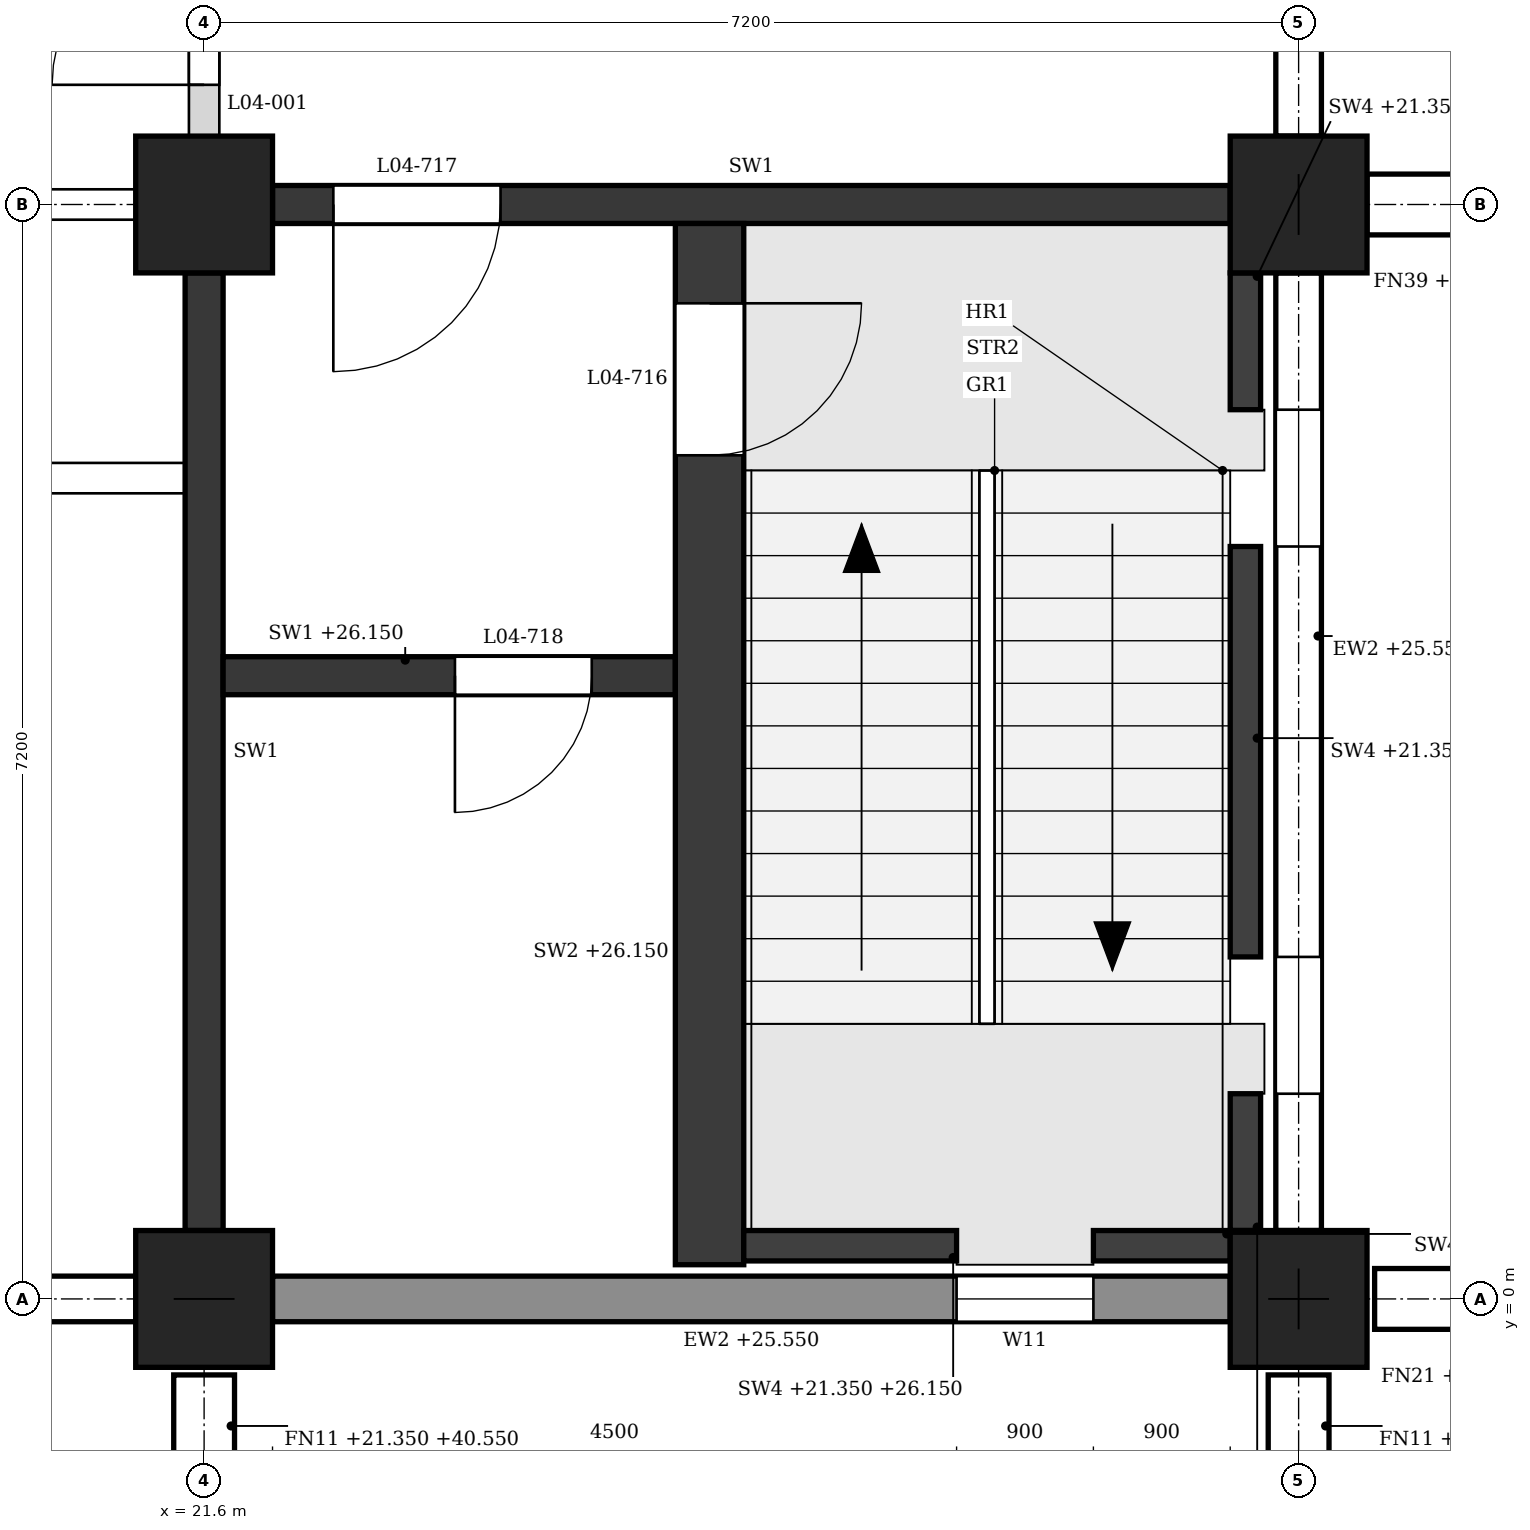
"""IFC4 building model, lengths in metres.
Left out: names, types, materials, properties, quantities, classifications, styles, units other than length and angle.
Written with IfcOpenShell. Run it as: python <this file> out.ifc"""

import sys

from ifc_helpers import new_model, si_unit, direction, frame, frame_2d, origin, origin_2d, place, context, subcontext, project, spatial, polyline, rectangle, outline, extrude, element, fill, save


model = new_model("IFC4")
c1 = context("Model", 3, precision=1e-05, world=origin(), true_north=direction((0.0, 1.0)))
c2 = subcontext(c1, "Body", "Model", "MODEL_VIEW")
j1 = project(units=[si_unit("LENGTHUNIT", "METRE"), si_unit("PLANEANGLEUNIT", "RADIAN")], contexts=[c1])
p1 = place(None, origin())
s1 = spatial("IfcSite", under=j1, at=p1, CompositionType="ELEMENT")
p2 = place(p1, origin())
s2 = spatial("IfcBuilding", under=s1, at=p2, CompositionType="ELEMENT")
p3 = place(p2, frame((0.0, 0.0, 21.6)))
s3 = spatial("IfcBuildingStorey", under=s2, at=p3, CompositionType="ELEMENT", Elevation=21.6)
for number, where, z_axis, x_axis in (
    (1, (21.6, 0.0, 0.0), (0.0, 0.0, 1.0), (1.0, 0.0, 0.0)),
    (2, (21.6, 7.2, 0.0), (0.0, 0.0, 1.0), (1.0, 0.0, 0.0)),
    (3, (28.8, 0.0, 0.0), (0.0, 0.0, 1.0), (1.0, 0.0, 0.0)),
    (4, (28.8, 7.2, 0.0), (0.0, 0.0, 1.0), (1.0, 0.0, 0.0)),
):
    element("IfcColumn", number, at=place(p3, frame(where, z_axis=z_axis, x_axis=x_axis)), inside=s3, PredefinedType="COLUMN", context=c2, shape_type="SweptSolid", body=[
        extrude(rectangle(XDim=0.9, YDim=0.9, at=origin_2d()), origin(), (0.0, 0.0, 1.0), 4.8),
    ])
p4 = place(p3, frame((14.85, 0.0, 0.0), z_axis=(0.0, 0.0, 1.0), x_axis=(1.0, 0.0, 0.0)))
e5 = element("IfcWall", 5, at=p4, inside=s3, PredefinedType="STANDARD", context=c2, shape_type="SweptSolid", body=[
    extrude(rectangle(XDim=6.3, YDim=0.3, at=frame_2d((3.15, 0.0))), origin(), (0.0, 0.0, 1.0), 3.95),
])
p5 = place(p4, frame((0.6, 0.0, 0.9)))
e6 = element("IfcOpeningElement", 6, at=p5, cuts=e5, PredefinedType="OPENING", context=c2, shape_type="SweptSolid", body=[
    extrude(outline(polyline([(0.0, 0.0), (1.5, 0.0), (1.5, 1.75), (0.75, 2.5), (0.0, 1.75), (0.0, 0.0)])), frame((0.0, 0.16, 0.0), z_axis=(0.0, -1.0, 0.0), x_axis=(1.0, 0.0, 0.0)), (0.0, 0.0, 1.0), 0.32),
])
p6 = place(p4, frame((4.2, 0.0, 0.9)))
e7 = element("IfcOpeningElement", 7, at=p6, cuts=e5, PredefinedType="OPENING", context=c2, shape_type="SweptSolid", body=[
    extrude(outline(polyline([(0.0, 0.0), (1.5, 0.0), (1.5, 1.75), (0.75, 2.5), (0.0, 1.75), (0.0, 0.0)])), frame((0.0, 0.16, 0.0), z_axis=(0.0, -1.0, 0.0), x_axis=(1.0, 0.0, 0.0)), (0.0, 0.0, 1.0), 0.32),
])
p7 = place(p3, frame((22.05, 0.0, 0.0), z_axis=(0.0, 0.0, 1.0), x_axis=(1.0, 0.0, 0.0)))
e8 = element("IfcWall", 8, at=p7, inside=s3, PredefinedType="STANDARD", context=c2, shape_type="SweptSolid", body=[
    extrude(rectangle(XDim=6.3, YDim=0.3, at=frame_2d((3.15, 0.0))), origin(), (0.0, 0.0, 1.0), 3.95),
])
p8 = place(p7, frame((4.5, 0.0, 0.9)))
e9 = element("IfcOpeningElement", 9, at=p8, cuts=e8, PredefinedType="OPENING", context=c2, shape_type="SweptSolid", body=[
    extrude(outline(polyline([(0.0, 0.0), (0.9, 0.0), (0.9, 2.05), (0.45, 2.5), (0.0, 2.05), (0.0, 0.0)])), frame((0.0, 0.16, 0.0), z_axis=(0.0, -1.0, 0.0), x_axis=(1.0, 0.0, 0.0)), (0.0, 0.0, 1.0), 0.32),
])
p9 = place(p3, frame((28.8, 0.45, 0.0), z_axis=(0.0, 0.0, 1.0), x_axis=(0.0, 1.0, 0.0)))
e10 = element("IfcWall", 10, at=p9, inside=s3, PredefinedType="STANDARD", context=c2, shape_type="SweptSolid", body=[
    extrude(rectangle(XDim=6.3, YDim=0.3, at=frame_2d((3.15, 0.0))), origin(), (0.0, 0.0, 1.0), 3.95),
])
p10 = place(p9, frame((0.9, 0.0, 0.9)))
e11 = element("IfcOpeningElement", 11, at=p10, cuts=e10, PredefinedType="OPENING", context=c2, shape_type="SweptSolid", body=[
    extrude(outline(polyline([(0.0, 0.0), (0.9, 0.0), (0.9, 2.05), (0.45, 2.5), (0.0, 2.05), (0.0, 0.0)])), frame((0.0, 0.16, 0.0), z_axis=(0.0, -1.0, 0.0), x_axis=(1.0, 0.0, 0.0)), (0.0, 0.0, 1.0), 0.32),
])
p11 = place(p9, frame((4.5, 0.0, 0.9)))
e12 = element("IfcOpeningElement", 12, at=p11, cuts=e10, PredefinedType="OPENING", context=c2, shape_type="SweptSolid", body=[
    extrude(outline(polyline([(0.0, 0.0), (0.9, 0.0), (0.9, 2.05), (0.45, 2.5), (0.0, 2.05), (0.0, 0.0)])), frame((0.0, 0.16, 0.0), z_axis=(0.0, -1.0, 0.0), x_axis=(1.0, 0.0, 0.0)), (0.0, 0.0, 1.0), 0.32),
])
p12 = place(p3, frame((28.8, 7.65, 0.0), z_axis=(0.0, 0.0, 1.0), x_axis=(0.0, 1.0, 0.0)))
e13 = element("IfcWall", 13, at=p12, inside=s3, PredefinedType="STANDARD", context=c2, shape_type="SweptSolid", body=[
    extrude(rectangle(XDim=6.3, YDim=0.3, at=frame_2d((3.15, 0.0))), origin(), (0.0, 0.0, 1.0), 3.95),
])
p13 = place(p12, frame((0.6, 0.0, 0.9)))
e14 = element("IfcOpeningElement", 14, at=p13, cuts=e13, PredefinedType="OPENING", context=c2, shape_type="SweptSolid", body=[
    extrude(outline(polyline([(0.0, 0.0), (1.5, 0.0), (1.5, 1.75), (0.75, 2.5), (0.0, 1.75), (0.0, 0.0)])), frame((0.0, 0.16, 0.0), z_axis=(0.0, -1.0, 0.0), x_axis=(1.0, 0.0, 0.0)), (0.0, 0.0, 1.0), 0.32),
])
for number, where, z_axis, x_axis in (
    (15, (21.6, -0.5, -0.25), (0.0, 0.0, 1.0), (0.0, -1.0, 0.0)),
    (16, (28.8, -0.5, -0.25), (0.0, 0.0, 1.0), (0.0, -1.0, 0.0)),
):
    element("IfcWall", number, at=place(p3, frame(where, z_axis=z_axis, x_axis=x_axis)), inside=s3, PredefinedType="POLYGONAL", context=c2, shape_type="SweptSolid", body=[
        extrude(outline(polyline([(0.85, 0.0), (0.85, 18.9), (0.65, 19.2), (0.0, 19.2), (0.0, 0.0), (0.85, 0.0)])), frame((0.0, 0.2, 0.0), z_axis=(0.0, -1.0, 0.0), x_axis=(1.0, 0.0, 0.0)), (0.0, 0.0, 1.0), 0.4),
    ])
for number, where, z_axis, x_axis in (
    (17, (29.3, 0.0, -0.25), (0.0, 0.0, 1.0), (1.0, 0.0, 0.0)),
    (18, (29.25, 7.2, -0.25), (0.0, 0.0, 1.0), (1.0, 0.0, 0.0)),
):
    element("IfcWall", number, at=place(p3, frame(where, z_axis=z_axis, x_axis=x_axis)), inside=s3, PredefinedType="POLYGONAL", context=c2, shape_type="SweptSolid", body=[
        extrude(outline(polyline([(0.6, 0.0), (0.6, 19.125), (0.55, 19.2), (0.0, 19.2), (0.0, 0.0), (0.6, 0.0)])), frame((0.0, 0.2, 0.0), z_axis=(0.0, -1.0, 0.0), x_axis=(1.0, 0.0, 0.0)), (0.0, 0.0, 1.0), 0.4),
    ])
p14 = place(p3, frame((22.05, 7.2, 0.0), z_axis=(0.0, 0.0, 1.0), x_axis=(1.0, 0.0, 0.0)))
e19 = element("IfcWall", 19, at=p14, inside=s3, PredefinedType="SHEAR", context=c2, shape_type="SweptSolid", body=[
    extrude(rectangle(XDim=6.3, YDim=0.25, at=frame_2d((3.15, 0.0))), origin(), (0.0, 0.0, 1.0), 3.8),
])
p15 = place(p14, frame((0.4, 0.0, 0.0)))
e20 = element("IfcOpeningElement", 20, at=p15, cuts=e19, PredefinedType="OPENING", context=c2, shape_type="SweptSolid", body=[
    extrude(rectangle(XDim=1.1, YDim=2.1, at=frame_2d((0.55, 1.05))), frame((0.0, 0.135, 0.0), z_axis=(0.0, -1.0, 0.0), x_axis=(1.0, 0.0, 0.0)), (0.0, 0.0, 1.0), 0.27),
])
p16 = place(p3, frame((21.6, 0.45, 0.0), z_axis=(0.0, 0.0, 1.0), x_axis=(0.0, 1.0, 0.0)))
e21 = element("IfcWall", 21, at=p16, inside=s3, PredefinedType="SHEAR", context=c2, shape_type="SweptSolid", body=[
    extrude(rectangle(XDim=6.3, YDim=0.25, at=frame_2d((3.15, 0.0))), origin(), (0.0, 0.0, 1.0), 3.8),
])
p17 = place(p3, frame((28.45, 0.45, -0.25), z_axis=(0.0, 0.0, 1.0), x_axis=(0.0, 1.0, 0.0)))
e22 = element("IfcWall", 22, at=p17, inside=s3, PredefinedType="SHEAR", context=c2, shape_type="SweptSolid", body=[
    extrude(rectangle(XDim=0.9, YDim=0.2, at=frame_2d((0.45, 0.0))), origin(), (0.0, 0.0, 1.0), 4.8),
])
p18 = place(p3, frame((28.45, 2.25, -0.25), z_axis=(0.0, 0.0, 1.0), x_axis=(0.0, 1.0, 0.0)))
e23 = element("IfcWall", 23, at=p18, inside=s3, PredefinedType="SHEAR", context=c2, shape_type="SweptSolid", body=[
    extrude(rectangle(XDim=2.7, YDim=0.2, at=frame_2d((1.35, 0.0))), origin(), (0.0, 0.0, 1.0), 4.8),
])
p19 = place(p3, frame((28.45, 5.85, -0.25), z_axis=(0.0, 0.0, 1.0), x_axis=(0.0, 1.0, 0.0)))
e24 = element("IfcWall", 24, at=p19, inside=s3, PredefinedType="SHEAR", context=c2, shape_type="SweptSolid", body=[
    extrude(rectangle(XDim=0.9, YDim=0.2, at=frame_2d((0.45, 0.0))), origin(), (0.0, 0.0, 1.0), 4.8),
])
p20 = place(p3, frame((25.15, 0.35, -0.25), z_axis=(0.0, 0.0, 1.0), x_axis=(1.0, 0.0, 0.0)))
e25 = element("IfcWall", 25, at=p20, inside=s3, PredefinedType="SHEAR", context=c2, shape_type="SweptSolid", body=[
    extrude(rectangle(XDim=1.4, YDim=0.2, at=frame_2d((0.7, 0.0))), origin(), (0.0, 0.0, 1.0), 4.8),
])
p21 = place(p3, frame((27.45, 0.35, -0.25), z_axis=(0.0, 0.0, 1.0), x_axis=(1.0, 0.0, 0.0)))
e26 = element("IfcWall", 26, at=p21, inside=s3, PredefinedType="SHEAR", context=c2, shape_type="SweptSolid", body=[
    extrude(rectangle(XDim=0.9, YDim=0.2, at=frame_2d((0.45, 0.0))), origin(), (0.0, 0.0, 1.0), 4.8),
])
p22 = place(p3, frame((24.925, 0.225, 0.0), z_axis=(0.0, 0.0, 1.0), x_axis=(0.0, 1.0, 0.0)))
e27 = element("IfcWall", 27, at=p22, inside=s3, PredefinedType="SHEAR", context=c2, shape_type="SweptSolid", body=[
    extrude(rectangle(XDim=6.85, YDim=0.45, at=frame_2d((3.425, 0.0))), origin(), (0.0, 0.0, 1.0), 4.55),
])
p23 = place(p22, frame((5.325, 0.0, 0.0)))
e28 = element("IfcOpeningElement", 28, at=p23, cuts=e27, PredefinedType="OPENING", context=c2, shape_type="SweptSolid", body=[
    extrude(rectangle(XDim=1.0, YDim=2.1, at=frame_2d((0.5, 1.05))), frame((0.0, 0.235, 0.0), z_axis=(0.0, -1.0, 0.0), x_axis=(1.0, 0.0, 0.0)), (0.0, 0.0, 1.0), 0.47),
])
p24 = place(p3, frame((21.725, 4.1, 0.0), z_axis=(0.0, 0.0, 1.0), x_axis=(1.0, 0.0, 0.0)))
e29 = element("IfcWall", 29, at=p24, inside=s3, PredefinedType="SHEAR", context=c2, shape_type="SweptSolid", body=[
    extrude(rectangle(XDim=2.975, YDim=0.25, at=frame_2d((1.487, 0.0))), origin(), (0.0, 0.0, 1.0), 4.55),
])
p25 = place(p24, frame((1.525, 0.0, 0.0)))
e30 = element("IfcOpeningElement", 30, at=p25, cuts=e29, PredefinedType="OPENING", context=c2, shape_type="SweptSolid", body=[
    extrude(rectangle(XDim=0.9, YDim=2.1, at=frame_2d((0.45, 1.05))), frame((0.0, 0.135, 0.0), z_axis=(0.0, -1.0, 0.0), x_axis=(1.0, 0.0, 0.0)), (0.0, 0.0, 1.0), 0.27),
])
p26 = place(p3, frame((7.325, 5.4, 0.0), z_axis=(0.0, 0.0, 1.0), x_axis=(1.0, 0.0, 0.0)))
e31 = element("IfcWall", 31, at=p26, inside=s3, PredefinedType="PARTITIONING", context=c2, shape_type="SweptSolid", body=[
    extrude(outline(polyline([(0.0, 0.0), (14.15, 0.0), (14.15, 3.8), (14.025, 3.8), (14.025, 4.55), (7.325, 4.55), (7.325, 3.8), (6.825, 3.8), (6.825, 4.55), (0.125, 4.55), (0.125, 3.8), (0.0, 3.8), (0.0, 0.0)])), frame((0.0, 0.1, 0.0), z_axis=(0.0, -1.0, 0.0), x_axis=(1.0, 0.0, 0.0)), (0.0, 0.0, 1.0), 0.2),
])
p27 = place(p26, frame((1.238, 0.0, 0.0)))
e32 = element("IfcOpeningElement", 32, at=p27, cuts=e31, PredefinedType="OPENING", context=c2, shape_type="SweptSolid", body=[
    extrude(rectangle(XDim=1.0, YDim=2.1, at=frame_2d((0.5, 1.05))), frame((0.0, 0.11, 0.0), z_axis=(0.0, -1.0, 0.0), x_axis=(1.0, 0.0, 0.0)), (0.0, 0.0, 1.0), 0.22),
])
p28 = place(p26, frame((4.775, 0.0, 0.0)))
e33 = element("IfcOpeningElement", 33, at=p28, cuts=e31, PredefinedType="OPENING", context=c2, shape_type="SweptSolid", body=[
    extrude(rectangle(XDim=1.0, YDim=2.1, at=frame_2d((0.5, 1.05))), frame((0.0, 0.11, 0.0), z_axis=(0.0, -1.0, 0.0), x_axis=(1.0, 0.0, 0.0)), (0.0, 0.0, 1.0), 0.22),
])
p29 = place(p26, frame((8.375, 0.0, 0.0)))
e34 = element("IfcOpeningElement", 34, at=p29, cuts=e31, PredefinedType="OPENING", context=c2, shape_type="SweptSolid", body=[
    extrude(rectangle(XDim=1.0, YDim=2.1, at=frame_2d((0.5, 1.05))), frame((0.0, 0.11, 0.0), z_axis=(0.0, -1.0, 0.0), x_axis=(1.0, 0.0, 0.0)), (0.0, 0.0, 1.0), 0.22),
])
p30 = place(p26, frame((11.913, 0.0, 0.0)))
e35 = element("IfcOpeningElement", 35, at=p30, cuts=e31, PredefinedType="OPENING", context=c2, shape_type="SweptSolid", body=[
    extrude(rectangle(XDim=1.0, YDim=2.1, at=frame_2d((0.5, 1.05))), frame((0.0, 0.11, 0.0), z_axis=(0.0, -1.0, 0.0), x_axis=(1.0, 0.0, 0.0)), (0.0, 0.0, 1.0), 0.22),
])
p31 = place(p3, frame((14.85, 7.2, 0.0), z_axis=(0.0, 0.0, 1.0), x_axis=(1.0, 0.0, 0.0)))
e36 = element("IfcWall", 36, at=p31, inside=s3, PredefinedType="PARTITIONING", context=c2, shape_type="SweptSolid", body=[
    extrude(rectangle(XDim=6.3, YDim=0.2, at=frame_2d((3.15, 0.0))), origin(), (0.0, 0.0, 1.0), 3.8),
])
p32 = place(p31, frame((4.225, 0.0, 0.0)))
e37 = element("IfcOpeningElement", 37, at=p32, cuts=e36, PredefinedType="OPENING", context=c2, shape_type="SweptSolid", body=[
    extrude(rectangle(XDim=1.0, YDim=2.1, at=frame_2d((0.5, 1.05))), frame((0.0, 0.11, 0.0), z_axis=(0.0, -1.0, 0.0), x_axis=(1.0, 0.0, 0.0)), (0.0, 0.0, 1.0), 0.22),
])
p33 = place(p3, frame((21.6, 7.65, 0.0), z_axis=(0.0, 0.0, 1.0), x_axis=(0.0, 1.0, 0.0)))
e38 = element("IfcWall", 38, at=p33, inside=s3, PredefinedType="PARTITIONING", context=c2, shape_type="SweptSolid", body=[
    extrude(rectangle(XDim=2.675, YDim=0.2, at=frame_2d((1.337, 0.0))), origin(), (0.0, 0.0, 1.0), 3.8),
])
p34 = place(p33, frame((0.337, 0.0, 0.0)))
e39 = element("IfcOpeningElement", 39, at=p34, cuts=e38, PredefinedType="OPENING", context=c2, shape_type="SweptSolid", body=[
    extrude(rectangle(XDim=2.0, YDim=2.4, at=frame_2d((1.0, 1.2))), frame((0.0, 0.11, 0.0), z_axis=(0.0, -1.0, 0.0), x_axis=(1.0, 0.0, 0.0)), (0.0, 0.0, 1.0), 0.22),
])
p35 = place(p10, origin())
e40 = element("IfcWindow", 40, at=p35, inside=s3, PartitioningType="SINGLE_PANEL", PredefinedType="WINDOW", context=c2, shape_type="SweptSolid", body=[
    extrude(outline(polyline([(0.0, 0.0), (0.9, 0.0), (0.9, 2.05), (0.45, 2.5), (0.0, 2.05), (0.0, 0.0)])), frame((0.0, 0.03, 0.0), z_axis=(0.0, -1.0, 0.0), x_axis=(1.0, 0.0, 0.0)), (0.0, 0.0, 1.0), 0.06),
])
fill(e11, e40)
p36 = place(p11, origin())
e41 = element("IfcWindow", 41, at=p36, inside=s3, PartitioningType="SINGLE_PANEL", PredefinedType="WINDOW", context=c2, shape_type="SweptSolid", body=[
    extrude(outline(polyline([(0.0, 0.0), (0.9, 0.0), (0.9, 2.05), (0.45, 2.5), (0.0, 2.05), (0.0, 0.0)])), frame((0.0, 0.03, 0.0), z_axis=(0.0, -1.0, 0.0), x_axis=(1.0, 0.0, 0.0)), (0.0, 0.0, 1.0), 0.06),
])
fill(e12, e41)
p37 = place(p8, origin())
e42 = element("IfcWindow", 42, at=p37, inside=s3, PartitioningType="SINGLE_PANEL", PredefinedType="WINDOW", context=c2, shape_type="SweptSolid", body=[
    extrude(outline(polyline([(0.0, 0.0), (0.9, 0.0), (0.9, 2.05), (0.45, 2.5), (0.0, 2.05), (0.0, 0.0)])), frame((0.0, 0.03, 0.0), z_axis=(0.0, -1.0, 0.0), x_axis=(1.0, 0.0, 0.0)), (0.0, 0.0, 1.0), 0.06),
])
fill(e9, e42)
p38 = place(p23, frame((1.0, 0.0, 0.0), z_axis=(0.0, 0.0, 1.0), x_axis=(-1.0, 0.0, 0.0)))
e43 = element("IfcDoor", 43, at=p38, inside=s3, OperationType="SINGLE_SWING_LEFT", PredefinedType="DOOR", context=c2, shape_type="SweptSolid", body=[
    extrude(rectangle(XDim=1.0, YDim=2.1, at=frame_2d((0.5, 1.05))), frame((0.0, 0.025, 0.0), z_axis=(0.0, -1.0, 0.0), x_axis=(1.0, 0.0, 0.0)), (0.0, 0.0, 1.0), 0.05),
])
fill(e28, e43)
p39 = place(p15, frame((1.1, 0.0, 0.0), z_axis=(0.0, 0.0, 1.0), x_axis=(-1.0, 0.0, 0.0)))
e44 = element("IfcDoor", 44, at=p39, inside=s3, OperationType="SINGLE_SWING_RIGHT", PredefinedType="DOOR", context=c2, shape_type="SweptSolid", body=[
    extrude(rectangle(XDim=1.1, YDim=2.1, at=frame_2d((0.55, 1.05))), frame((0.0, 0.025, 0.0), z_axis=(0.0, -1.0, 0.0), x_axis=(1.0, 0.0, 0.0)), (0.0, 0.0, 1.0), 0.05),
])
fill(e20, e44)
p40 = place(p25, frame((0.9, 0.0, 0.0), z_axis=(0.0, 0.0, 1.0), x_axis=(-1.0, 0.0, 0.0)))
e45 = element("IfcDoor", 45, at=p40, inside=s3, OperationType="SINGLE_SWING_RIGHT", PredefinedType="DOOR", context=c2, shape_type="SweptSolid", body=[
    extrude(rectangle(XDim=0.9, YDim=2.1, at=frame_2d((0.45, 1.05))), frame((0.0, 0.025, 0.0), z_axis=(0.0, -1.0, 0.0), x_axis=(1.0, 0.0, 0.0)), (0.0, 0.0, 1.0), 0.05),
])
fill(e30, e45)
p41 = place(p34, origin())
e46 = element("IfcDoor", 46, at=p41, inside=s3, OperationType="DOUBLE_DOOR_SINGLE_SWING", PredefinedType="DOOR", context=c2, shape_type="SweptSolid", body=[
    extrude(rectangle(XDim=2.0, YDim=2.4, at=frame_2d((1.0, 1.2))), frame((0.0, 0.025, 0.0), z_axis=(0.0, -1.0, 0.0), x_axis=(1.0, 0.0, 0.0)), (0.0, 0.0, 1.0), 0.05),
])
fill(e39, e46)
save(model, sys.argv[1])
